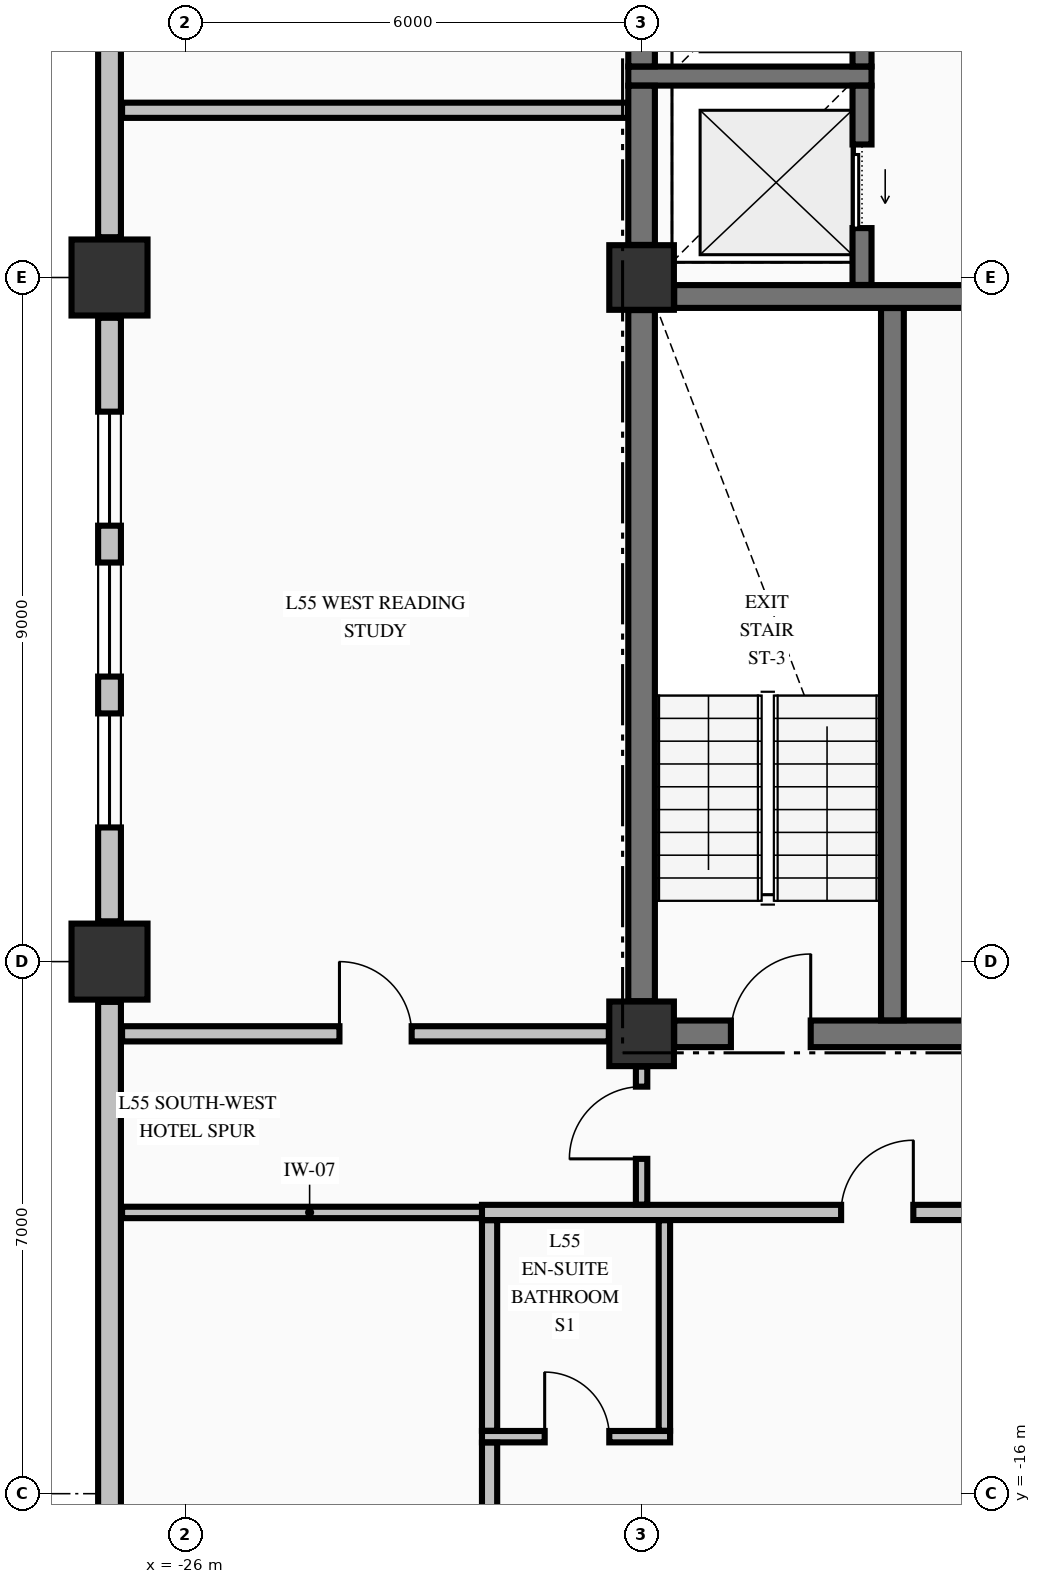
"""IFC4 building model, lengths in metres.
Left out: names, types, materials, properties, quantities, classifications, styles, units other than length and angle.
Written with IfcOpenShell. Run it as: python <this file> out.ifc"""

import sys

from ifc_helpers import new_model, si_unit, direction, frame, frame_2d, origin, origin_2d, place, context, subcontext, project, spatial, rectangle, extrude, element, fill, save


model = new_model("IFC4")
c1 = context("Model", 3, precision=1e-05, world=origin(), true_north=direction((0.0, 1.0)))
c2 = subcontext(c1, "Body", "Model", "MODEL_VIEW")
j1 = project(units=[si_unit("LENGTHUNIT", "METRE"), si_unit("PLANEANGLEUNIT", "RADIAN")], contexts=[c1])
p1 = place(None, origin())
s1 = spatial("IfcSite", under=j1, at=p1, CompositionType="ELEMENT")
p2 = place(p1, origin())
s2 = spatial("IfcBuilding", under=s1, at=p2, CompositionType="ELEMENT")
p3 = place(p2, frame((0.0, 0.0, 211.86)))
s3 = spatial("IfcBuildingStorey", under=s2, at=p3, CompositionType="ELEMENT", Elevation=211.86)
for number, where, z_axis, x_axis in (
    (1, (-27.0, -9.0, -0.325), (0.0, 0.0, 1.0), (1.0, 0.0, 0.0)),
    (2, (-27.0, 0.0, -0.325), (0.0, 0.0, 1.0), (1.0, 0.0, 0.0)),
):
    element("IfcColumn", number, at=place(p3, frame(where, z_axis=z_axis, x_axis=x_axis)), inside=s3, PredefinedType="COLUMN", context=c2, shape_type="SweptSolid", body=[
        extrude(rectangle(XDim=1.0, YDim=1.0, at=origin_2d()), origin(), (0.0, 0.0, 1.0), 3.475),
    ])
for number, where, z_axis, x_axis in (
    (3, (-20.0, -9.95, -0.325), (0.0, 0.0, 1.0), (1.0, 0.0, 0.0)),
    (4, (-20.0, 0.0, -0.325), (0.0, 0.0, 1.0), (1.0, 0.0, 0.0)),
):
    element("IfcColumn", number, at=place(p3, frame(where, z_axis=z_axis, x_axis=x_axis)), inside=s3, PredefinedType="COLUMN", context=c2, shape_type="SweptSolid", body=[
        extrude(rectangle(XDim=0.85, YDim=0.85, at=origin_2d()), origin(), (0.0, 0.0, 1.0), 3.475),
    ])
p4 = place(p3, frame((-27.0, -9.53, 0.0), z_axis=(0.0, 0.0, 1.0), x_axis=(0.0, -1.0, 0.0)))
e5 = element("IfcWall", 5, at=p4, inside=s3, PredefinedType="STANDARD", context=c2, shape_type="SweptSolid", body=[
    extrude(rectangle(XDim=9.44, YDim=0.3, at=frame_2d((4.72, 0.0))), origin(), (0.0, 0.0, 1.0), 2.542),
])
p5 = place(p3, frame((-27.0, -0.53, 0.0), z_axis=(0.0, 0.0, 1.0), x_axis=(0.0, -1.0, 0.0)))
e6 = element("IfcWall", 6, at=p5, inside=s3, PredefinedType="STANDARD", context=c2, shape_type="SweptSolid", body=[
    extrude(rectangle(XDim=7.94, YDim=0.3, at=frame_2d((3.97, 0.0))), origin(), (0.0, 0.0, 1.0), 2.542),
])
p6 = place(p5, frame((1.235, 0.0, 0.72)))
e7 = element("IfcOpeningElement", 7, at=p6, cuts=e6, PredefinedType="OPENING", context=c2, shape_type="SweptSolid", body=[
    extrude(rectangle(XDim=1.5, YDim=1.6, at=frame_2d((0.75, 0.8))), frame((0.0, 0.16, 0.0), z_axis=(0.0, -1.0, 0.0), x_axis=(1.0, 0.0, 0.0)), (0.0, 0.0, 1.0), 0.32),
])
p7 = place(p5, frame((3.22, 0.0, 0.72)))
e8 = element("IfcOpeningElement", 8, at=p7, cuts=e6, PredefinedType="OPENING", context=c2, shape_type="SweptSolid", body=[
    extrude(rectangle(XDim=1.5, YDim=1.6, at=frame_2d((0.75, 0.8))), frame((0.0, 0.16, 0.0), z_axis=(0.0, -1.0, 0.0), x_axis=(1.0, 0.0, 0.0)), (0.0, 0.0, 1.0), 0.32),
])
p8 = place(p5, frame((5.205, 0.0, 0.72)))
e9 = element("IfcOpeningElement", 9, at=p8, cuts=e6, PredefinedType="OPENING", context=c2, shape_type="SweptSolid", body=[
    extrude(rectangle(XDim=1.5, YDim=1.6, at=frame_2d((0.75, 0.8))), frame((0.0, 0.16, 0.0), z_axis=(0.0, -1.0, 0.0), x_axis=(1.0, 0.0, 0.0)), (0.0, 0.0, 1.0), 0.32),
])
p9 = place(p3, frame((-27.0, 8.47, 0.0), z_axis=(0.0, 0.0, 1.0), x_axis=(0.0, -1.0, 0.0)))
e10 = element("IfcWall", 10, at=p9, inside=s3, PredefinedType="STANDARD", context=c2, shape_type="SweptSolid", body=[
    extrude(rectangle(XDim=7.94, YDim=0.3, at=frame_2d((3.97, 0.0))), origin(), (0.0, 0.0, 1.0), 2.542),
])
p10 = place(p9, frame((1.235, 0.0, 0.72)))
e11 = element("IfcOpeningElement", 11, at=p10, cuts=e10, PredefinedType="OPENING", context=c2, shape_type="SweptSolid", body=[
    extrude(rectangle(XDim=1.5, YDim=1.6, at=frame_2d((0.75, 0.8))), frame((0.0, 0.16, 0.0), z_axis=(0.0, -1.0, 0.0), x_axis=(1.0, 0.0, 0.0)), (0.0, 0.0, 1.0), 0.32),
])
p11 = place(p9, frame((3.22, 0.0, 0.72)))
e12 = element("IfcOpeningElement", 12, at=p11, cuts=e10, PredefinedType="OPENING", context=c2, shape_type="SweptSolid", body=[
    extrude(rectangle(XDim=1.5, YDim=1.6, at=frame_2d((0.75, 0.8))), frame((0.0, 0.16, 0.0), z_axis=(0.0, -1.0, 0.0), x_axis=(1.0, 0.0, 0.0)), (0.0, 0.0, 1.0), 0.32),
])
p12 = place(p3, frame((-19.571, -9.95, 0.0), z_axis=(0.0, 0.0, 1.0), x_axis=(1.0, 0.0, 0.0)))
e13 = element("IfcWall", 13, at=p12, inside=s3, PredefinedType="SHEAR", context=c2, shape_type="SweptSolid", body=[
    extrude(rectangle(XDim=4.871, YDim=0.35, at=frame_2d((2.436, 0.0))), origin(), (0.0, 0.0, 1.0), 3.15),
])
p13 = place(p12, frame((0.746, 0.0, 0.0)))
e14 = element("IfcOpeningElement", 14, at=p13, cuts=e13, PredefinedType="OPENING", context=c2, shape_type="SweptSolid", body=[
    extrude(rectangle(XDim=1.05, YDim=2.15, at=frame_2d((0.525, 1.075))), frame((0.0, 0.185, 0.0), z_axis=(0.0, -1.0, 0.0), x_axis=(1.0, 0.0, 0.0)), (0.0, 0.0, 1.0), 0.37),
])
p14 = place(p3, frame((-19.571, -0.25, 0.0), z_axis=(0.0, 0.0, 1.0), x_axis=(1.0, 0.0, 0.0)))
e15 = element("IfcWall", 15, at=p14, inside=s3, PredefinedType="SHEAR", context=c2, shape_type="SweptSolid", body=[
    extrude(rectangle(XDim=8.142, YDim=0.3, at=frame_2d((4.071, 0.0))), origin(), (0.0, 0.0, 1.0), 3.15),
])
p15 = place(p14, frame((5.871, 0.0, 0.0)))
e16 = element("IfcOpeningElement", 16, at=p15, cuts=e15, PredefinedType="OPENING", context=c2, shape_type="SweptSolid", body=[
    extrude(rectangle(XDim=1.1, YDim=2.15, at=frame_2d((0.55, 1.075))), frame((0.0, 0.16, 0.0), z_axis=(0.0, -1.0, 0.0), x_axis=(1.0, 0.0, 0.0)), (0.0, 0.0, 1.0), 0.32),
])
p16 = place(p3, frame((-20.175, 2.65, 0.0), z_axis=(0.0, 0.0, 1.0), x_axis=(1.0, 0.0, 0.0)))
e17 = element("IfcWall", 17, at=p16, inside=s3, PredefinedType="SOLIDWALL", context=c2, shape_type="SweptSolid", body=[
    extrude(rectangle(XDim=3.2, YDim=0.25, at=frame_2d((1.6, 0.0))), origin(), (0.0, 0.0, 1.0), 3.15),
])
p17 = place(p3, frame((-22.1, -15.25, 0.0), z_axis=(0.0, 0.0, 1.0), x_axis=(1.0, 0.0, 0.0)))
e18 = element("IfcWall", 18, at=p17, inside=s3, PredefinedType="PARTITIONING", context=c2, shape_type="SweptSolid", body=[
    extrude(rectangle(XDim=2.475, YDim=0.15, at=frame_2d((1.238, 0.0))), origin(), (0.0, 0.0, 1.0), 3.15),
])
p18 = place(p17, frame((0.825, 0.0, 0.0)))
e19 = element("IfcOpeningElement", 19, at=p18, cuts=e18, PredefinedType="OPENING", context=c2, shape_type="SweptSolid", body=[
    extrude(rectangle(XDim=0.85, YDim=2.1, at=frame_2d((0.425, 1.05))), frame((0.0, 0.085, 0.0), z_axis=(0.0, -1.0, 0.0), x_axis=(1.0, 0.0, 0.0)), (0.0, 0.0, 1.0), 0.17),
])
p19 = place(p3, frame((-26.835, -12.3, 0.0), z_axis=(0.0, 0.0, 1.0), x_axis=(1.0, 0.0, 0.0)))
e20 = element("IfcWall", 20, at=p19, inside=s3, PredefinedType="PARTITIONING", context=c2, shape_type="SweptSolid", body=[
    extrude(rectangle(XDim=4.935, YDim=0.15, at=frame_2d((2.468, 0.0))), origin(), (0.0, 0.0, 1.0), 3.15),
])
p20 = place(p3, frame((-22.1, -12.3, 0.0), z_axis=(0.0, 0.0, 1.0), x_axis=(1.0, 0.0, 0.0)))
e21 = element("IfcWall", 21, at=p20, inside=s3, PredefinedType="PARTITIONING", context=c2, shape_type="SweptSolid", body=[
    extrude(rectangle(XDim=39.2, YDim=0.2, at=frame_2d((19.6, 0.0))), origin(), (0.0, 0.0, 1.0), 3.15),
])
p21 = place(p20, frame((4.725, 0.0, 0.0)))
e22 = element("IfcOpeningElement", 22, at=p21, cuts=e21, PredefinedType="OPENING", context=c2, shape_type="SweptSolid", body=[
    extrude(rectangle(XDim=0.95, YDim=2.15, at=frame_2d((0.475, 1.075))), frame((0.0, 0.11, 0.0), z_axis=(0.0, -1.0, 0.0), x_axis=(1.0, 0.0, 0.0)), (0.0, 0.0, 1.0), 0.22),
])
p22 = place(p20, frame((12.625, 0.0, 0.0)))
e23 = element("IfcOpeningElement", 23, at=p22, cuts=e21, PredefinedType="OPENING", context=c2, shape_type="SweptSolid", body=[
    extrude(rectangle(XDim=0.95, YDim=2.15, at=frame_2d((0.475, 1.075))), frame((0.0, 0.11, 0.0), z_axis=(0.0, -1.0, 0.0), x_axis=(1.0, 0.0, 0.0)), (0.0, 0.0, 1.0), 0.22),
])
p23 = place(p20, frame((19.375, 0.0, 0.0)))
e24 = element("IfcOpeningElement", 24, at=p23, cuts=e21, PredefinedType="OPENING", context=c2, shape_type="SweptSolid", body=[
    extrude(rectangle(XDim=0.95, YDim=2.15, at=frame_2d((0.475, 1.075))), frame((0.0, 0.11, 0.0), z_axis=(0.0, -1.0, 0.0), x_axis=(1.0, 0.0, 0.0)), (0.0, 0.0, 1.0), 0.22),
])
p24 = place(p20, frame((30.375, 0.0, 0.0)))
e25 = element("IfcOpeningElement", 25, at=p24, cuts=e21, PredefinedType="OPENING", context=c2, shape_type="SweptSolid", body=[
    extrude(rectangle(XDim=0.95, YDim=2.15, at=frame_2d((0.475, 1.075))), frame((0.0, 0.11, 0.0), z_axis=(0.0, -1.0, 0.0), x_axis=(1.0, 0.0, 0.0)), (0.0, 0.0, 1.0), 0.22),
])
p25 = place(p3, frame((-26.835, -9.95, 0.0), z_axis=(0.0, 0.0, 1.0), x_axis=(1.0, 0.0, 0.0)))
e26 = element("IfcWall", 26, at=p25, inside=s3, PredefinedType="PARTITIONING", context=c2, shape_type="SweptSolid", body=[
    extrude(rectangle(XDim=6.404, YDim=0.2, at=frame_2d((3.202, 0.0))), origin(), (0.0, 0.0, 1.0), 3.15),
])
p26 = place(p25, frame((2.86, 0.0, 0.0)))
e27 = element("IfcOpeningElement", 27, at=p26, cuts=e26, PredefinedType="OPENING", context=c2, shape_type="SweptSolid", body=[
    extrude(rectangle(XDim=0.95, YDim=2.15, at=frame_2d((0.475, 1.075))), frame((0.0, 0.11, 0.0), z_axis=(0.0, -1.0, 0.0), x_axis=(1.0, 0.0, 0.0)), (0.0, 0.0, 1.0), 0.22),
])
p27 = place(p3, frame((-26.835, 2.2, 0.0), z_axis=(0.0, 0.0, 1.0), x_axis=(1.0, 0.0, 0.0)))
e28 = element("IfcWall", 28, at=p27, inside=s3, PredefinedType="PARTITIONING", context=c2, shape_type="SweptSolid", body=[
    extrude(rectangle(XDim=6.657, YDim=0.2, at=frame_2d((3.329, 0.0))), origin(), (0.0, 0.0, 1.0), 3.15),
])
p28 = place(p3, frame((-20.0, -9.521, 0.0), z_axis=(0.0, 0.0, 1.0), x_axis=(0.0, 1.0, 0.0)))
e29 = element("IfcWall", 29, at=p28, inside=s3, PredefinedType="SHEAR", context=c2, shape_type="SweptSolid", body=[
    extrude(rectangle(XDim=9.092, YDim=0.35, at=frame_2d((4.546, 0.0))), origin(), (0.0, 0.0, 1.0), 3.15),
])
p29 = place(p3, frame((-20.0, 0.429, 0.0), z_axis=(0.0, 0.0, 1.0), x_axis=(0.0, 1.0, 0.0)))
e30 = element("IfcWall", 30, at=p29, inside=s3, PredefinedType="SHEAR", context=c2, shape_type="SweptSolid", body=[
    extrude(rectangle(XDim=2.094, YDim=0.35, at=frame_2d((1.047, 0.0))), origin(), (0.0, 0.0, 1.0), 3.15),
])
p30 = place(p3, frame((-20.0, 2.777, 0.0), z_axis=(0.0, 0.0, 1.0), x_axis=(0.0, 1.0, 0.0)))
e31 = element("IfcWall", 31, at=p30, inside=s3, PredefinedType="SHEAR", context=c2, shape_type="SweptSolid", body=[
    extrude(rectangle(XDim=2.296, YDim=0.35, at=frame_2d((1.148, 0.0))), origin(), (0.0, 0.0, 1.0), 3.15),
])
p31 = place(p3, frame((-17.1, -0.098, 0.0), z_axis=(0.0, 0.0, 1.0), x_axis=(0.0, 1.0, 0.0)))
e32 = element("IfcWall", 32, at=p31, inside=s3, PredefinedType="SOLIDWALL", context=c2, shape_type="SweptSolid", body=[
    extrude(rectangle(XDim=2.621, YDim=0.25, at=frame_2d((1.311, 0.0))), origin(), (0.0, 0.0, 1.0), 3.15),
])
p32 = place(p31, frame((0.748, 0.0, 0.0)))
e33 = element("IfcOpeningElement", 33, at=p32, cuts=e32, PredefinedType="OPENING", context=c2, shape_type="SweptSolid", body=[
    extrude(rectangle(XDim=1.1, YDim=2.2, at=frame_2d((0.55, 1.1))), frame((0.0, 0.135, 0.0), z_axis=(0.0, -1.0, 0.0), x_axis=(1.0, 0.0, 0.0)), (0.0, 0.0, 1.0), 0.27),
])
p33 = place(p3, frame((-17.1, 2.777, 0.0), z_axis=(0.0, 0.0, 1.0), x_axis=(0.0, 1.0, 0.0)))
e34 = element("IfcWall", 34, at=p33, inside=s3, PredefinedType="SOLIDWALL", context=c2, shape_type="SweptSolid", body=[
    extrude(rectangle(XDim=2.296, YDim=0.25, at=frame_2d((1.148, 0.0))), origin(), (0.0, 0.0, 1.0), 3.15),
])
p34 = place(p33, frame((0.598, 0.0, 0.0)))
e35 = element("IfcOpeningElement", 35, at=p34, cuts=e34, PredefinedType="OPENING", context=c2, shape_type="SweptSolid", body=[
    extrude(rectangle(XDim=1.1, YDim=2.2, at=frame_2d((0.55, 1.1))), frame((0.0, 0.135, 0.0), z_axis=(0.0, -1.0, 0.0), x_axis=(1.0, 0.0, 0.0)), (0.0, 0.0, 1.0), 0.27),
])
p35 = place(p3, frame((-16.7, -9.773, 0.0), z_axis=(0.0, 0.0, 1.0), x_axis=(0.0, 1.0, 0.0)))
e36 = element("IfcWall", 36, at=p35, inside=s3, PredefinedType="SHEAR", context=c2, shape_type="SweptSolid", body=[
    extrude(rectangle(XDim=9.371, YDim=0.3, at=frame_2d((4.686, 0.0))), origin(), (0.0, 0.0, 1.0), 3.15),
])
p36 = place(p3, frame((-22.0, -18.994, 0.0), z_axis=(0.0, 0.0, 1.0), x_axis=(0.0, 1.0, 0.0)))
e37 = element("IfcWall", 37, at=p36, inside=s3, PredefinedType="PARTITIONING", context=c2, shape_type="SweptSolid", body=[
    extrude(rectangle(XDim=3.666, YDim=0.2, at=frame_2d((1.833, 0.0))), origin(), (0.0, 0.0, 1.0), 3.15),
])
p37 = place(p3, frame((-22.0, -15.172, 0.0), z_axis=(0.0, 0.0, 1.0), x_axis=(0.0, 1.0, 0.0)))
e38 = element("IfcWall", 38, at=p37, inside=s3, PredefinedType="PARTITIONING", context=c2, shape_type="SweptSolid", body=[
    extrude(rectangle(XDim=2.769, YDim=0.2, at=frame_2d((1.385, 0.0))), origin(), (0.0, 0.0, 1.0), 3.15),
])
p38 = place(p3, frame((-20.0, -12.197, 0.0), z_axis=(0.0, 0.0, 1.0), x_axis=(0.0, 1.0, 0.0)))
e39 = element("IfcWall", 39, at=p38, inside=s3, PredefinedType="PARTITIONING", context=c2, shape_type="SweptSolid", body=[
    extrude(rectangle(XDim=1.816, YDim=0.15, at=frame_2d((0.908, 0.0))), origin(), (0.0, 0.0, 1.0), 2.342),
])
p39 = place(p38, frame((0.602, 0.0, 0.0)))
e40 = element("IfcOpeningElement", 40, at=p39, cuts=e39, PredefinedType="OPENING", context=c2, shape_type="SweptSolid", body=[
    extrude(rectangle(XDim=0.95, YDim=2.15, at=frame_2d((0.475, 1.075))), frame((0.0, 0.085, 0.0), z_axis=(0.0, -1.0, 0.0), x_axis=(1.0, 0.0, 0.0)), (0.0, 0.0, 1.0), 0.17),
])
p40 = place(p3, frame((-19.7, -15.172, 0.0), z_axis=(0.0, 0.0, 1.0), x_axis=(0.0, 1.0, 0.0)))
e41 = element("IfcWall", 41, at=p40, inside=s3, PredefinedType="PARTITIONING", context=c2, shape_type="SweptSolid", body=[
    extrude(rectangle(XDim=2.769, YDim=0.15, at=frame_2d((1.385, 0.0))), origin(), (0.0, 0.0, 1.0), 2.342),
])
p41 = place(p6, origin())
e42 = element("IfcWindow", 42, at=p41, inside=s3, PartitioningType="SINGLE_PANEL", PredefinedType="WINDOW", context=c2, shape_type="SweptSolid", body=[
    extrude(rectangle(XDim=1.5, YDim=1.6, at=frame_2d((0.75, 0.8))), frame((0.0, 0.03, 0.0), z_axis=(0.0, -1.0, 0.0), x_axis=(1.0, 0.0, 0.0)), (0.0, 0.0, 1.0), 0.06),
])
fill(e7, e42)
p42 = place(p7, origin())
e43 = element("IfcWindow", 43, at=p42, inside=s3, PartitioningType="SINGLE_PANEL", PredefinedType="WINDOW", context=c2, shape_type="SweptSolid", body=[
    extrude(rectangle(XDim=1.5, YDim=1.6, at=frame_2d((0.75, 0.8))), frame((0.0, 0.03, 0.0), z_axis=(0.0, -1.0, 0.0), x_axis=(1.0, 0.0, 0.0)), (0.0, 0.0, 1.0), 0.06),
])
fill(e8, e43)
p43 = place(p8, origin())
e44 = element("IfcWindow", 44, at=p43, inside=s3, PartitioningType="SINGLE_PANEL", PredefinedType="WINDOW", context=c2, shape_type="SweptSolid", body=[
    extrude(rectangle(XDim=1.5, YDim=1.6, at=frame_2d((0.75, 0.8))), frame((0.0, 0.03, 0.0), z_axis=(0.0, -1.0, 0.0), x_axis=(1.0, 0.0, 0.0)), (0.0, 0.0, 1.0), 0.06),
])
fill(e9, e44)
p44 = place(p13, origin())
e45 = element("IfcDoor", 45, at=p44, inside=s3, OperationType="SINGLE_SWING_RIGHT", PredefinedType="DOOR", context=c2, shape_type="SweptSolid", body=[
    extrude(rectangle(XDim=1.05, YDim=2.15, at=frame_2d((0.525, 1.075))), frame((0.0, 0.025, 0.0), z_axis=(0.0, -1.0, 0.0), x_axis=(1.0, 0.0, 0.0)), (0.0, 0.0, 1.0), 0.05),
])
fill(e14, e45)
p45 = place(p32, origin())
e46 = element("IfcDoor", 46, at=p45, inside=s3, OperationType="SLIDING_TO_LEFT", PredefinedType="DOOR", context=c2, shape_type="SweptSolid", body=[
    extrude(rectangle(XDim=1.1, YDim=2.2, at=frame_2d((0.55, 1.1))), frame((0.0, 0.025, 0.0), z_axis=(0.0, -1.0, 0.0), x_axis=(1.0, 0.0, 0.0)), (0.0, 0.0, 1.0), 0.05),
])
fill(e33, e46)
p46 = place(p21, origin())
e47 = element("IfcDoor", 47, at=p46, inside=s3, OperationType="SINGLE_SWING_RIGHT", PredefinedType="DOOR", context=c2, shape_type="SweptSolid", body=[
    extrude(rectangle(XDim=0.95, YDim=2.15, at=frame_2d((0.475, 1.075))), frame((0.0, 0.025, 0.0), z_axis=(0.0, -1.0, 0.0), x_axis=(1.0, 0.0, 0.0)), (0.0, 0.0, 1.0), 0.05),
])
fill(e22, e47)
p47 = place(p18, origin())
e48 = element("IfcDoor", 48, at=p47, inside=s3, OperationType="SINGLE_SWING_LEFT", PredefinedType="DOOR", context=c2, shape_type="SweptSolid", body=[
    extrude(rectangle(XDim=0.85, YDim=2.1, at=frame_2d((0.425, 1.05))), frame((0.0, 0.025, 0.0), z_axis=(0.0, -1.0, 0.0), x_axis=(1.0, 0.0, 0.0)), (0.0, 0.0, 1.0), 0.05),
])
fill(e19, e48)
p48 = place(p39, origin())
e49 = element("IfcDoor", 49, at=p48, inside=s3, OperationType="SINGLE_SWING_LEFT", PredefinedType="DOOR", context=c2, shape_type="SweptSolid", body=[
    extrude(rectangle(XDim=0.95, YDim=2.15, at=frame_2d((0.475, 1.075))), frame((0.0, 0.025, 0.0), z_axis=(0.0, -1.0, 0.0), x_axis=(1.0, 0.0, 0.0)), (0.0, 0.0, 1.0), 0.05),
])
fill(e40, e49)
p49 = place(p26, origin())
e50 = element("IfcDoor", 50, at=p49, inside=s3, OperationType="SINGLE_SWING_LEFT", PredefinedType="DOOR", context=c2, shape_type="SweptSolid", body=[
    extrude(rectangle(XDim=0.95, YDim=2.15, at=frame_2d((0.475, 1.075))), frame((0.0, 0.025, 0.0), z_axis=(0.0, -1.0, 0.0), x_axis=(1.0, 0.0, 0.0)), (0.0, 0.0, 1.0), 0.05),
])
fill(e27, e50)
save(model, sys.argv[1])
